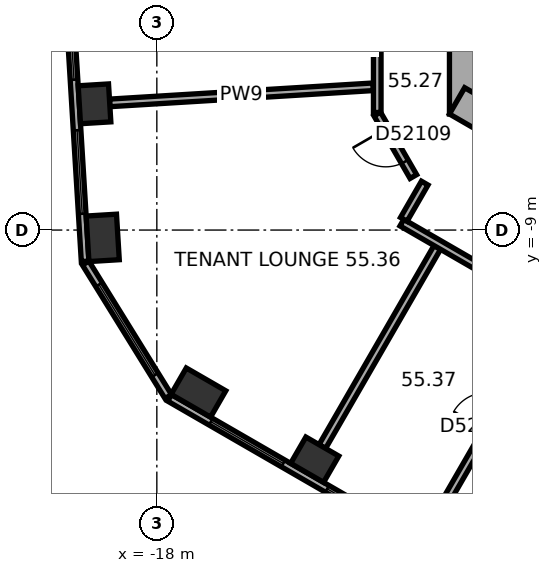
"""IFC4 building model, lengths in metres.
Left out: names, types, materials, properties, quantities, classifications, styles, units other than length and angle.
Written with IfcOpenShell. Run it as: python <this file> out.ifc"""

import sys

from ifc_helpers import new_model, si_unit, direction, frame, frame_2d, origin, origin_2d, place, context, subcontext, project, spatial, rectangle, extrude, element, fill, save


model = new_model("IFC4")
c1 = context("Model", 3, precision=1e-05, world=origin(), true_north=direction((0.0, 1.0)))
c2 = subcontext(c1, "Body", "Model", "MODEL_VIEW")
j1 = project(units=[si_unit("LENGTHUNIT", "METRE"), si_unit("PLANEANGLEUNIT", "RADIAN")], contexts=[c1])
p1 = place(None, origin())
s1 = spatial("IfcSite", under=j1, at=p1, CompositionType="ELEMENT")
p2 = place(p1, origin())
s2 = spatial("IfcBuilding", under=s1, at=p2, CompositionType="ELEMENT")
p3 = place(p2, frame((0.0, 0.0, 225.4)))
s3 = spatial("IfcBuildingStorey", under=s2, at=p3, CompositionType="ELEMENT", Elevation=225.4)
p4 = place(p3, frame((-19.64, -5.679, 0.0), z_axis=(0.0, 0.0, 1.0), x_axis=(0.061048539535, -0.998134798422, 0.0)))
e1 = element("IfcColumn", 1, at=p4, inside=s3, PredefinedType="COLUMN", context=c2, shape_type="SweptSolid", body=[
    extrude(rectangle(XDim=1.0, YDim=0.8, at=origin_2d()), origin(), (0.0, 0.0, 1.0), 3.7),
])
for number, where, z_axis, x_axis in (
    (2, (-19.424, -9.206, 0.0), (0.0, 0.0, 1.0), (0.061, -0.998, 0.0)),
    (3, (-16.906, -13.276, 0.0), (0.0, 0.0, 1.0), (0.866, -0.5, 0.0)),
):
    element("IfcColumn", number, at=place(p3, frame(where, z_axis=z_axis, x_axis=x_axis)), inside=s3, PredefinedType="COLUMN", context=c2, shape_type="SweptSolid", body=[
        extrude(rectangle(XDim=1.2, YDim=0.8, at=origin_2d()), origin(), (0.0, 0.0, 1.0), 3.7),
    ])
p5 = place(p3, frame((-13.845, -15.042, 0.0), z_axis=(0.0, 0.0, 1.0), x_axis=(0.866025403784, -0.5, 0.0)))
e4 = element("IfcColumn", 4, at=p5, inside=s3, PredefinedType="COLUMN", context=c2, shape_type="SweptSolid", body=[
    extrude(rectangle(XDim=1.0, YDim=0.8, at=origin_2d()), origin(), (0.0, 0.0, 1.0), 3.7),
])
p6 = place(p3, frame((-9.9, 5.947, 0.0), z_axis=(0.0, 0.0, 1.0), x_axis=(0.0, -1.0, 0.0)))
e5 = element("IfcWall", 5, at=p6, inside=s3, PredefinedType="SHEAR", context=c2, shape_type="SweptSolid", body=[
    extrude(rectangle(XDim=11.894, YDim=0.8, at=frame_2d((5.947, 0.0))), origin(), (0.0, 0.0, 1.0), 3.7),
])
p7 = place(p6, frame((5.097, 0.0, 0.0)))
e6 = element("IfcOpeningElement", 6, at=p7, cuts=e5, PredefinedType="OPENING", context=c2, shape_type="SweptSolid", body=[
    extrude(rectangle(XDim=1.1, YDim=2.1, at=frame_2d((0.55, 1.05))), frame((0.0, 0.41, 0.0), z_axis=(0.0, -1.0, 0.0), x_axis=(1.0, 0.0, 0.0)), (0.0, 0.0, 1.0), 0.82),
])
p8 = place(p6, frame((7.697, 0.0, 0.0)))
e7 = element("IfcOpeningElement", 7, at=p8, cuts=e5, PredefinedType="OPENING", context=c2, shape_type="SweptSolid", body=[
    extrude(rectangle(XDim=1.1, YDim=2.1, at=frame_2d((0.55, 1.05))), frame((0.0, 0.41, 0.0), z_axis=(0.0, -1.0, 0.0), x_axis=(1.0, 0.0, 0.0)), (0.0, 0.0, 1.0), 0.82),
])
p9 = place(p3, frame((-10.1, -5.6, 0.0), z_axis=(0.0, 0.0, 1.0), x_axis=(0.866023897231, -0.500002609418, 0.0)))
e8 = element("IfcWall", 8, at=p9, inside=s3, PredefinedType="SHEAR", context=c2, shape_type="SweptSolid", body=[
    extrude(rectangle(XDim=11.894, YDim=0.8, at=frame_2d((5.947, 0.0))), origin(), (0.0, 0.0, 1.0), 3.7),
])
p10 = place(p9, frame((6.147, 0.0, 0.0)))
e9 = element("IfcOpeningElement", 9, at=p10, cuts=e8, PredefinedType="OPENING", context=c2, shape_type="SweptSolid", body=[
    extrude(rectangle(XDim=1.5, YDim=2.1, at=frame_2d((0.75, 1.05))), frame((0.0, 0.41, 0.0), z_axis=(0.0, -1.0, 0.0), x_axis=(1.0, 0.0, 0.0)), (0.0, 0.0, 1.0), 0.82),
])
p11 = place(p9, frame((1.597, 0.0, 0.0)))
e10 = element("IfcOpeningElement", 10, at=p11, cuts=e8, PredefinedType="OPENING", context=c2, shape_type="SweptSolid", body=[
    extrude(rectangle(XDim=1.1, YDim=2.1, at=frame_2d((0.55, 1.05))), frame((0.0, 0.41, 0.0), z_axis=(0.0, -1.0, 0.0), x_axis=(1.0, 0.0, 0.0)), (0.0, 0.0, 1.0), 0.82),
])
p12 = place(p9, frame((4.197, 0.0, 0.0)))
e11 = element("IfcOpeningElement", 11, at=p12, cuts=e8, PredefinedType="OPENING", context=c2, shape_type="SweptSolid", body=[
    extrude(rectangle(XDim=1.1, YDim=2.1, at=frame_2d((0.55, 1.05))), frame((0.0, 0.41, 0.0), z_axis=(0.0, -1.0, 0.0), x_axis=(1.0, 0.0, 0.0)), (0.0, 0.0, 1.0), 0.82),
])
p13 = place(p3, frame((-21.038, 8.984, 0.0), z_axis=(0.0, 0.0, 1.0), x_axis=(0.061043935634, -0.998135079998, 0.0)))
e12 = element("IfcWall", 12, at=p13, inside=s3, PredefinedType="STANDARD", context=c2, shape_type="SweptSolid", body=[
    extrude(rectangle(XDim=18.841, YDim=0.2, at=frame_2d((9.421, 0.0))), origin(), (0.0, 0.0, 1.0), 3.7),
])
p14 = place(p13, frame((1.253, 0.0, 0.9)))
e13 = element("IfcOpeningElement", 13, at=p14, cuts=e12, PredefinedType="OPENING", context=c2, shape_type="SweptSolid", body=[
    extrude(rectangle(XDim=2.2, YDim=2.0, at=frame_2d((1.1, 1.0))), frame((0.0, 0.11, 0.0), z_axis=(0.0, -1.0, 0.0), x_axis=(1.0, 0.0, 0.0)), (0.0, 0.0, 1.0), 0.22),
])
p15 = place(p13, frame((4.786, 0.0, 0.9)))
e14 = element("IfcOpeningElement", 14, at=p15, cuts=e12, PredefinedType="OPENING", context=c2, shape_type="SweptSolid", body=[
    extrude(rectangle(XDim=2.2, YDim=2.0, at=frame_2d((1.1, 1.0))), frame((0.0, 0.11, 0.0), z_axis=(0.0, -1.0, 0.0), x_axis=(1.0, 0.0, 0.0)), (0.0, 0.0, 1.0), 0.22),
])
p16 = place(p13, frame((8.32, 0.0, 0.9)))
e15 = element("IfcOpeningElement", 15, at=p16, cuts=e12, PredefinedType="OPENING", context=c2, shape_type="SweptSolid", body=[
    extrude(rectangle(XDim=2.2, YDim=2.0, at=frame_2d((1.1, 1.0))), frame((0.0, 0.11, 0.0), z_axis=(0.0, -1.0, 0.0), x_axis=(1.0, 0.0, 0.0)), (0.0, 0.0, 1.0), 0.22),
])
p17 = place(p13, frame((11.854, 0.0, 0.9)))
e16 = element("IfcOpeningElement", 16, at=p17, cuts=e12, PredefinedType="OPENING", context=c2, shape_type="SweptSolid", body=[
    extrude(rectangle(XDim=2.2, YDim=2.0, at=frame_2d((1.1, 1.0))), frame((0.0, 0.11, 0.0), z_axis=(0.0, -1.0, 0.0), x_axis=(1.0, 0.0, 0.0)), (0.0, 0.0, 1.0), 0.22),
])
p18 = place(p13, frame((15.387, 0.0, 0.9)))
e17 = element("IfcOpeningElement", 17, at=p18, cuts=e12, PredefinedType="OPENING", context=c2, shape_type="SweptSolid", body=[
    extrude(rectangle(XDim=2.2, YDim=2.0, at=frame_2d((1.1, 1.0))), frame((0.0, 0.11, 0.0), z_axis=(0.0, -1.0, 0.0), x_axis=(1.0, 0.0, 0.0)), (0.0, 0.0, 1.0), 0.22),
])
p19 = place(p3, frame((-19.873, -9.869, 0.0), z_axis=(0.0, 0.0, 1.0), x_axis=(0.52626914263, -0.850318051975, 0.0)))
e18 = element("IfcWall", 18, at=p19, inside=s3, PredefinedType="STANDARD", context=c2, shape_type="SweptSolid", body=[
    extrude(rectangle(XDim=4.13, YDim=0.2, at=frame_2d((2.065, 0.0))), origin(), (0.0, 0.0, 1.0), 3.7),
])
p20 = place(p19, frame((0.665, 0.0, 0.9)))
e19 = element("IfcOpeningElement", 19, at=p20, cuts=e18, PredefinedType="OPENING", context=c2, shape_type="SweptSolid", body=[
    extrude(rectangle(XDim=2.8, YDim=2.0, at=frame_2d((1.4, 1.0))), frame((0.0, 0.11, 0.0), z_axis=(0.0, -1.0, 0.0), x_axis=(1.0, 0.0, 0.0)), (0.0, 0.0, 1.0), 0.22),
])
p21 = place(p3, frame((-17.664, -13.415, 0.0), z_axis=(0.0, 0.0, 1.0), x_axis=(0.866026555358, -0.49999800541, 0.0)))
e20 = element("IfcWall", 20, at=p21, inside=s3, PredefinedType="STANDARD", context=c2, shape_type="SweptSolid", body=[
    extrude(rectangle(XDim=18.841, YDim=0.2, at=frame_2d((9.421, 0.0))), origin(), (0.0, 0.0, 1.0), 3.7),
])
p22 = place(p21, frame((1.254, 0.0, 0.9)))
e21 = element("IfcOpeningElement", 21, at=p22, cuts=e20, PredefinedType="OPENING", context=c2, shape_type="SweptSolid", body=[
    extrude(rectangle(XDim=2.2, YDim=2.0, at=frame_2d((1.1, 1.0))), frame((0.0, 0.11, 0.0), z_axis=(0.0, -1.0, 0.0), x_axis=(1.0, 0.0, 0.0)), (0.0, 0.0, 1.0), 0.22),
])
p23 = place(p21, frame((4.788, 0.0, 0.9)))
e22 = element("IfcOpeningElement", 22, at=p23, cuts=e20, PredefinedType="OPENING", context=c2, shape_type="SweptSolid", body=[
    extrude(rectangle(XDim=2.2, YDim=2.0, at=frame_2d((1.1, 1.0))), frame((0.0, 0.11, 0.0), z_axis=(0.0, -1.0, 0.0), x_axis=(1.0, 0.0, 0.0)), (0.0, 0.0, 1.0), 0.22),
])
p24 = place(p21, frame((8.322, 0.0, 0.9)))
e23 = element("IfcOpeningElement", 23, at=p24, cuts=e20, PredefinedType="OPENING", context=c2, shape_type="SweptSolid", body=[
    extrude(rectangle(XDim=2.2, YDim=2.0, at=frame_2d((1.1, 1.0))), frame((0.0, 0.11, 0.0), z_axis=(0.0, -1.0, 0.0), x_axis=(1.0, 0.0, 0.0)), (0.0, 0.0, 1.0), 0.22),
])
p25 = place(p21, frame((11.855, 0.0, 0.9)))
e24 = element("IfcOpeningElement", 24, at=p25, cuts=e20, PredefinedType="OPENING", context=c2, shape_type="SweptSolid", body=[
    extrude(rectangle(XDim=2.2, YDim=2.0, at=frame_2d((1.1, 1.0))), frame((0.0, 0.11, 0.0), z_axis=(0.0, -1.0, 0.0), x_axis=(1.0, 0.0, 0.0)), (0.0, 0.0, 1.0), 0.22),
])
p26 = place(p21, frame((15.389, 0.0, 0.9)))
e25 = element("IfcOpeningElement", 25, at=p26, cuts=e20, PredefinedType="OPENING", context=c2, shape_type="SweptSolid", body=[
    extrude(rectangle(XDim=2.2, YDim=2.0, at=frame_2d((1.1, 1.0))), frame((0.0, 0.11, 0.0), z_axis=(0.0, -1.0, 0.0), x_axis=(1.0, 0.0, 0.0)), (0.0, 0.0, 1.0), 0.22),
])
p27 = place(p3, frame((-19.241, -5.654, 0.0), z_axis=(0.0, 0.0, 1.0), x_axis=(0.998135538818, 0.061036432963, 0.0)))
e26 = element("IfcWall", 26, at=p27, inside=s3, PredefinedType="PARTITIONING", context=c2, shape_type="SweptSolid", body=[
    extrude(rectangle(XDim=6.944, YDim=0.2, at=frame_2d((3.472, 0.0))), origin(), (0.0, 0.0, 1.0), 2.87),
])
p28 = place(p3, frame((-13.646, -14.696, 0.0), z_axis=(0.0, 0.0, 1.0), x_axis=(0.500006596359, 0.866021595341, 0.0)))
e27 = element("IfcWall", 27, at=p28, inside=s3, PredefinedType="PARTITIONING", context=c2, shape_type="SweptSolid", body=[
    extrude(rectangle(XDim=6.049, YDim=0.2, at=frame_2d((3.025, 0.0))), origin(), (0.0, 0.0, 1.0), 3.42),
])
p29 = place(p3, frame((-12.2, -5.947, 0.0), z_axis=(0.0, 0.0, 1.0), x_axis=(0.500022797313, -0.86601224135, 0.0)))
e28 = element("IfcWall", 28, at=p29, inside=s3, PredefinedType="PARTITIONING", context=c2, shape_type="SweptSolid", body=[
    extrude(rectangle(XDim=1.9, YDim=0.2, at=frame_2d((0.95, 0.0))), origin(), (0.0, 0.0, 1.0), 3.42),
])
p30 = place(p29, frame((0.45, 0.0, 0.0)))
e29 = element("IfcOpeningElement", 29, at=p30, cuts=e28, PredefinedType="OPENING", context=c2, shape_type="SweptSolid", body=[
    extrude(rectangle(XDim=1.0, YDim=2.1, at=frame_2d((0.5, 1.05))), frame((0.0, 0.11, 0.0), z_axis=(0.0, -1.0, 0.0), x_axis=(1.0, 0.0, 0.0)), (0.0, 0.0, 1.0), 0.22),
])
p31 = place(p3, frame((-12.2, -4.201, 0.0), z_axis=(0.0, 0.0, 1.0), x_axis=(0.0, -1.0, 0.0)))
e30 = element("IfcWall", 30, at=p31, inside=s3, PredefinedType="PARTITIONING", context=c2, shape_type="SweptSolid", body=[
    extrude(rectangle(XDim=1.706, YDim=0.2, at=frame_2d((0.853, 0.0))), origin(), (0.0, 0.0, 1.0), 3.42),
])
p32 = place(p3, frame((-11.551, -8.805, 0.0), z_axis=(0.0, 0.0, 1.0), x_axis=(0.866038310922, -0.499977643516, 0.0)))
e31 = element("IfcWall", 31, at=p32, inside=s3, PredefinedType="PARTITIONING", context=c2, shape_type="SweptSolid", body=[
    extrude(rectangle(XDim=4.665, YDim=0.2, at=frame_2d((2.333, 0.0))), origin(), (0.0, 0.0, 1.0), 3.42),
])
p33 = place(p3, frame((-10.951, -7.765, 0.0), z_axis=(0.0, 0.0, 1.0), x_axis=(-0.499978356969, -0.866037899034, 0.0)))
e32 = element("IfcWall", 32, at=p33, inside=s3, PredefinedType="PARTITIONING", context=c2, shape_type="SweptSolid", body=[
    extrude(rectangle(XDim=1.101, YDim=0.2, at=frame_2d((0.551, 0.0))), origin(), (0.0, 0.0, 1.0), 3.42),
])
p34 = place(p3, frame((-10.585, -16.463, 0.0), z_axis=(0.0, 0.0, 1.0), x_axis=(0.499993802756, 0.866028981735, 0.0)))
e33 = element("IfcWall", 33, at=p34, inside=s3, PredefinedType="PARTITIONING", context=c2, shape_type="SweptSolid", body=[
    extrude(rectangle(XDim=6.049, YDim=0.2, at=frame_2d((3.024, 0.0))), origin(), (0.0, 0.0, 1.0), 2.87),
])
p35 = place(p34, frame((2.524, 0.0, 0.0)))
e34 = element("IfcOpeningElement", 34, at=p35, cuts=e33, PredefinedType="OPENING", context=c2, shape_type="SweptSolid", body=[
    extrude(rectangle(XDim=1.0, YDim=2.1, at=frame_2d((0.5, 1.05))), frame((0.0, 0.11, 0.0), z_axis=(0.0, -1.0, 0.0), x_axis=(1.0, 0.0, 0.0)), (0.0, 0.0, 1.0), 0.22),
])
p36 = place(p17, origin())
e35 = element("IfcWindow", 35, at=p36, inside=s3, PartitioningType="SINGLE_PANEL", PredefinedType="WINDOW", context=c2, shape_type="SweptSolid", body=[
    extrude(rectangle(XDim=2.2, YDim=2.0, at=frame_2d((1.1, 1.0))), frame((0.0, 0.03, 0.0), z_axis=(0.0, -1.0, 0.0), x_axis=(1.0, 0.0, 0.0)), (0.0, 0.0, 1.0), 0.06),
])
fill(e16, e35)
p37 = place(p18, origin())
e36 = element("IfcWindow", 36, at=p37, inside=s3, PartitioningType="SINGLE_PANEL", PredefinedType="WINDOW", context=c2, shape_type="SweptSolid", body=[
    extrude(rectangle(XDim=2.2, YDim=2.0, at=frame_2d((1.1, 1.0))), frame((0.0, 0.03, 0.0), z_axis=(0.0, -1.0, 0.0), x_axis=(1.0, 0.0, 0.0)), (0.0, 0.0, 1.0), 0.06),
])
fill(e17, e36)
p38 = place(p20, origin())
e37 = element("IfcWindow", 37, at=p38, inside=s3, PartitioningType="SINGLE_PANEL", PredefinedType="WINDOW", context=c2, shape_type="SweptSolid", body=[
    extrude(rectangle(XDim=2.8, YDim=2.0, at=frame_2d((1.4, 1.0))), frame((0.0, 0.03, 0.0), z_axis=(0.0, -1.0, 0.0), x_axis=(1.0, 0.0, 0.0)), (0.0, 0.0, 1.0), 0.06),
])
fill(e19, e37)
p39 = place(p22, origin())
e38 = element("IfcWindow", 38, at=p39, inside=s3, PartitioningType="SINGLE_PANEL", PredefinedType="WINDOW", context=c2, shape_type="SweptSolid", body=[
    extrude(rectangle(XDim=2.2, YDim=2.0, at=frame_2d((1.1, 1.0))), frame((0.0, 0.03, 0.0), z_axis=(0.0, -1.0, 0.0), x_axis=(1.0, 0.0, 0.0)), (0.0, 0.0, 1.0), 0.06),
])
fill(e21, e38)
p40 = place(p23, origin())
e39 = element("IfcWindow", 39, at=p40, inside=s3, PartitioningType="SINGLE_PANEL", PredefinedType="WINDOW", context=c2, shape_type="SweptSolid", body=[
    extrude(rectangle(XDim=2.2, YDim=2.0, at=frame_2d((1.1, 1.0))), frame((0.0, 0.03, 0.0), z_axis=(0.0, -1.0, 0.0), x_axis=(1.0, 0.0, 0.0)), (0.0, 0.0, 1.0), 0.06),
])
fill(e22, e39)
p41 = place(p30, origin())
e40 = element("IfcDoor", 40, at=p41, inside=s3, OperationType="SINGLE_SWING_LEFT", PredefinedType="DOOR", context=c2, shape_type="SweptSolid", body=[
    extrude(rectangle(XDim=1.0, YDim=2.1, at=frame_2d((0.5, 1.05))), frame((0.0, 0.025, 0.0), z_axis=(0.0, -1.0, 0.0), x_axis=(1.0, 0.0, 0.0)), (0.0, 0.0, 1.0), 0.05),
])
fill(e29, e40)
save(model, sys.argv[1])
